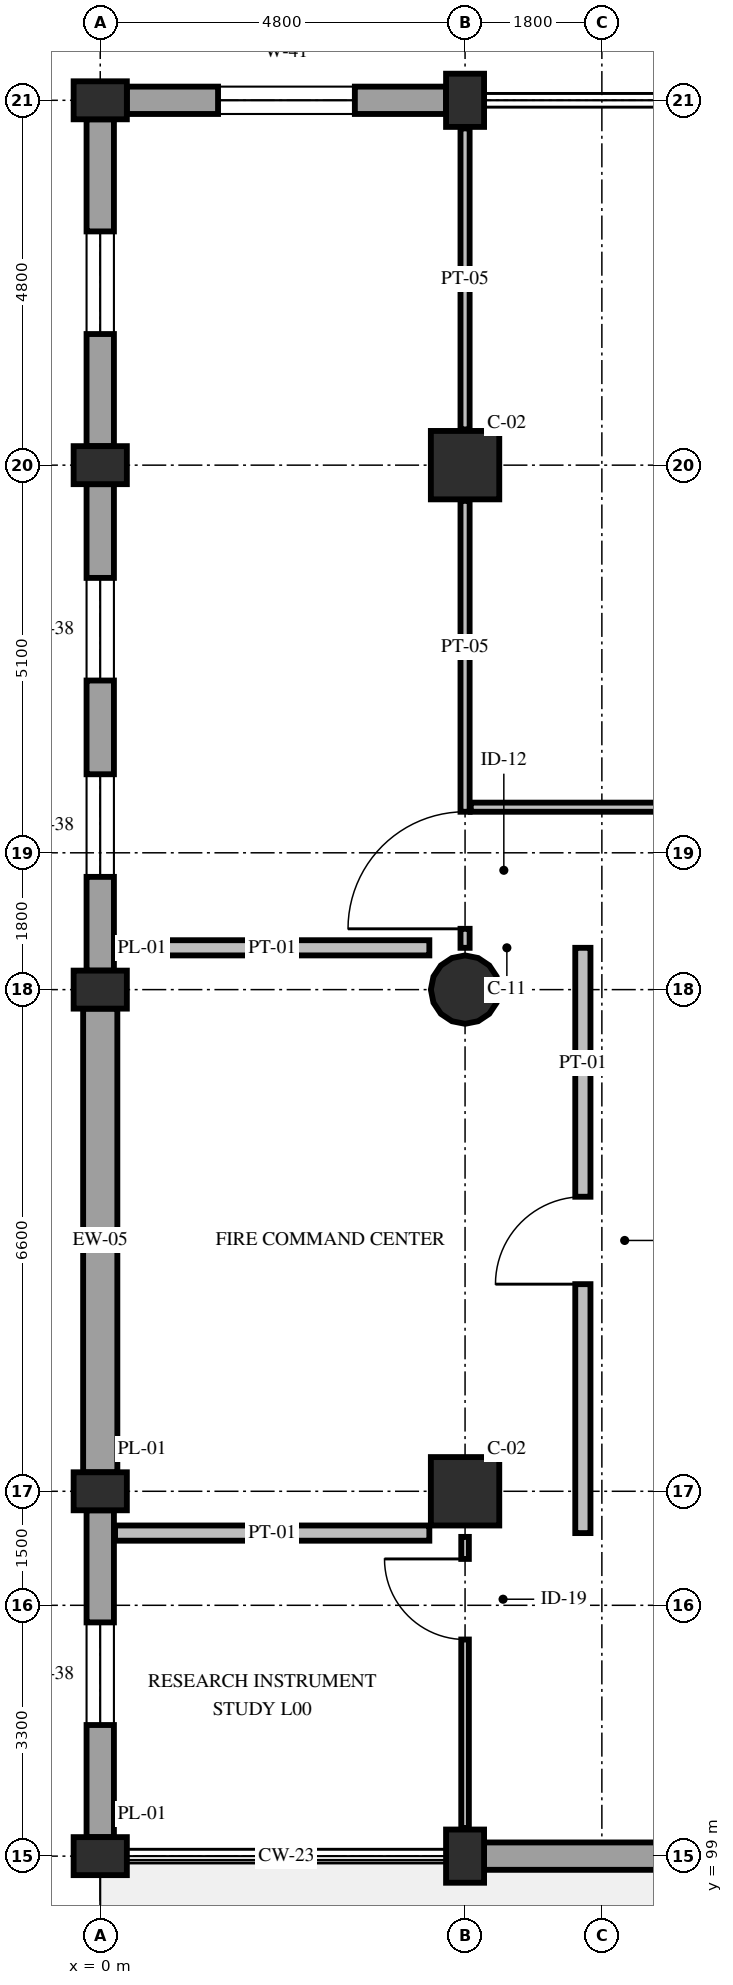
"""IFC4 building model, lengths in metres.
Left out: names, types, materials, properties, quantities, classifications, styles, units other than length and angle.
Written with IfcOpenShell. Run it as: python <this file> out.ifc"""

import sys

from ifc_helpers import new_model, si_unit, direction, frame, frame_2d, origin, origin_2d, place, context, subcontext, project, spatial, rectangle, circle, extrude, element, fill, save


model = new_model("IFC4")
c1 = context("Model", 3, precision=1e-05, world=origin(), true_north=direction((0.0, 1.0)))
c2 = subcontext(c1, "Body", "Model", "MODEL_VIEW")
j1 = project(units=[si_unit("LENGTHUNIT", "METRE"), si_unit("PLANEANGLEUNIT", "RADIAN")], contexts=[c1])
p1 = place(None, origin())
s1 = spatial("IfcSite", under=j1, at=p1, CompositionType="ELEMENT")
p2 = place(p1, origin())
s2 = spatial("IfcBuilding", under=s1, at=p2, CompositionType="ELEMENT")
p3 = place(p2, origin())
s3 = spatial("IfcBuildingStorey", under=s2, at=p3, CompositionType="ELEMENT", Elevation=0.0)
for number, where, z_axis, x_axis in (
    (1, (0.0, 99.0, 0.0), (0.0, 0.0, 1.0), (0.0, 1.0, 0.0)),
    (2, (0.0, 103.8, 0.0), (0.0, 0.0, 1.0), (0.0, 1.0, 0.0)),
    (3, (0.0, 110.4, 0.0), (0.0, 0.0, 1.0), (0.0, 1.0, 0.0)),
    (4, (0.0, 117.3, 0.0), (0.0, 0.0, 1.0), (0.0, 1.0, 0.0)),
    (5, (0.0, 122.1, 0.0), (0.0, 0.0, 1.0), (0.0, 1.0, 0.0)),
    (6, (4.8, 99.0, 0.0), (0.0, 0.0, 1.0), (1.0, 0.0, 0.0)),
):
    element("IfcColumn", number, at=place(p3, frame(where, z_axis=z_axis, x_axis=x_axis)), inside=s3, PredefinedType="PILASTER", context=c2, shape_type="SweptSolid", body=[
        extrude(rectangle(XDim=0.5, YDim=0.7, at=origin_2d()), origin(), (0.0, 0.0, 1.0), 5.4),
    ])
p4 = place(p3, frame((4.8, 103.8, 0.0), z_axis=(0.0, 0.0, 1.0), x_axis=(1.0, 0.0, 0.0)))
e7 = element("IfcColumn", 7, at=p4, inside=s3, PredefinedType="COLUMN", context=c2, shape_type="SweptSolid", body=[
    extrude(rectangle(XDim=0.9, YDim=0.9, at=origin_2d()), origin(), (0.0, 0.0, 1.0), 5.4),
])
p5 = place(p3, frame((4.8, 110.4, 0.0), z_axis=(0.0, 0.0, 1.0), x_axis=(1.0, 0.0, 0.0)))
e8 = element("IfcColumn", 8, at=p5, inside=s3, PredefinedType="COLUMN", context=c2, shape_type="SweptSolid", body=[
    extrude(circle(Radius=0.45, at=origin_2d()), origin(), (0.0, 0.0, 1.0), 5.4),
])
p6 = place(p3, frame((4.8, 117.3, 0.0), z_axis=(0.0, 0.0, 1.0), x_axis=(1.0, 0.0, 0.0)))
e9 = element("IfcColumn", 9, at=p6, inside=s3, PredefinedType="COLUMN", context=c2, shape_type="SweptSolid", body=[
    extrude(rectangle(XDim=0.9, YDim=0.9, at=origin_2d()), origin(), (0.0, 0.0, 1.0), 5.4),
])
p7 = place(p3, frame((4.8, 122.1, 0.0), z_axis=(0.0, 0.0, 1.0), x_axis=(1.0, 0.0, 0.0)))
e10 = element("IfcColumn", 10, at=p7, inside=s3, PredefinedType="PILASTER", context=c2, shape_type="SweptSolid", body=[
    extrude(rectangle(XDim=0.5, YDim=0.7, at=origin_2d()), origin(), (0.0, 0.0, 1.0), 5.4),
])
p8 = place(p3, frame((0.0, 99.25, 0.0), z_axis=(0.0, 0.0, 1.0), x_axis=(0.0, 1.0, 0.0)))
e11 = element("IfcWall", 11, at=p8, inside=s3, PredefinedType="STANDARD", context=c2, shape_type="SweptSolid", body=[
    extrude(rectangle(XDim=4.3, YDim=0.36, at=frame_2d((2.15, 0.0))), origin(), (0.0, 0.0, 1.0), 4.55),
])
p9 = place(p8, frame((1.475, 0.0, 0.85)))
e12 = element("IfcOpeningElement", 12, at=p9, cuts=e11, PredefinedType="OPENING", context=c2, shape_type="SweptSolid", body=[
    extrude(rectangle(XDim=1.35, YDim=2.08, at=frame_2d((0.675, 1.04))), frame((0.0, 0.195, 0.0), z_axis=(0.0, -1.0, 0.0), x_axis=(1.0, 0.0, 0.0)), (0.0, 0.0, 1.0), 0.39),
])
p10 = place(p3, frame((0.0, 104.05, 0.0), z_axis=(0.0, 0.0, 1.0), x_axis=(0.0, 1.0, 0.0)))
e13 = element("IfcWall", 13, at=p10, inside=s3, PredefinedType="SOLIDWALL", context=c2, shape_type="SweptSolid", body=[
    extrude(rectangle(XDim=6.1, YDim=0.45, at=frame_2d((3.05, 0.0))), origin(), (0.0, 0.0, 1.0), 4.55),
])
p11 = place(p3, frame((0.0, 110.65, 0.0), z_axis=(0.0, 0.0, 1.0), x_axis=(0.0, 1.0, 0.0)))
e14 = element("IfcWall", 14, at=p11, inside=s3, PredefinedType="STANDARD", context=c2, shape_type="SweptSolid", body=[
    extrude(rectangle(XDim=6.4, YDim=0.36, at=frame_2d((3.2, 0.0))), origin(), (0.0, 0.0, 1.0), 4.55),
])
p12 = place(p11, frame((1.233, 0.0, 0.85)))
e15 = element("IfcOpeningElement", 15, at=p12, cuts=e14, PredefinedType="OPENING", context=c2, shape_type="SweptSolid", body=[
    extrude(rectangle(XDim=1.35, YDim=2.08, at=frame_2d((0.675, 1.04))), frame((0.0, 0.195, 0.0), z_axis=(0.0, -1.0, 0.0), x_axis=(1.0, 0.0, 0.0)), (0.0, 0.0, 1.0), 0.39),
])
p13 = place(p11, frame((3.817, 0.0, 0.85)))
e16 = element("IfcOpeningElement", 16, at=p13, cuts=e14, PredefinedType="OPENING", context=c2, shape_type="SweptSolid", body=[
    extrude(rectangle(XDim=1.35, YDim=2.08, at=frame_2d((0.675, 1.04))), frame((0.0, 0.195, 0.0), z_axis=(0.0, -1.0, 0.0), x_axis=(1.0, 0.0, 0.0)), (0.0, 0.0, 1.0), 0.39),
])
p14 = place(p3, frame((0.0, 117.55, 0.0), z_axis=(0.0, 0.0, 1.0), x_axis=(0.0, 1.0, 0.0)))
e17 = element("IfcWall", 17, at=p14, inside=s3, PredefinedType="STANDARD", context=c2, shape_type="SweptSolid", body=[
    extrude(rectangle(XDim=4.3, YDim=0.36, at=frame_2d((2.15, 0.0))), origin(), (0.0, 0.0, 1.0), 4.55),
])
p15 = place(p14, frame((1.475, 0.0, 0.85)))
e18 = element("IfcOpeningElement", 18, at=p15, cuts=e17, PredefinedType="OPENING", context=c2, shape_type="SweptSolid", body=[
    extrude(rectangle(XDim=1.35, YDim=2.08, at=frame_2d((0.675, 1.04))), frame((0.0, 0.195, 0.0), z_axis=(0.0, -1.0, 0.0), x_axis=(1.0, 0.0, 0.0)), (0.0, 0.0, 1.0), 0.39),
])
p16 = place(p3, frame((0.35, 122.1, 0.0), z_axis=(0.0, 0.0, 1.0), x_axis=(1.0, 0.0, 0.0)))
e19 = element("IfcWall", 19, at=p16, inside=s3, PredefinedType="STANDARD", context=c2, shape_type="SweptSolid", body=[
    extrude(rectangle(XDim=4.2, YDim=0.36, at=frame_2d((2.1, 0.0))), origin(), (0.0, 0.0, 1.0), 4.55),
])
p17 = place(p16, frame((1.2, 0.0, 0.85)))
e20 = element("IfcOpeningElement", 20, at=p17, cuts=e19, PredefinedType="OPENING", context=c2, shape_type="SweptSolid", body=[
    extrude(rectangle(XDim=1.8, YDim=2.24, at=frame_2d((0.9, 1.12))), frame((0.0, 0.195, 0.0), z_axis=(0.0, -1.0, 0.0), x_axis=(1.0, 0.0, 0.0)), (0.0, 0.0, 1.0), 0.39),
])
p18 = place(p3, frame((12.95, 99.0, 0.0), z_axis=(0.0, 0.0, 1.0), x_axis=(-1.0, 0.0, 0.0)))
e21 = element("IfcWall", 21, at=p18, inside=s3, PredefinedType="STANDARD", context=c2, shape_type="SweptSolid", body=[
    extrude(rectangle(XDim=7.9, YDim=0.36, at=frame_2d((3.95, 0.0))), origin(), (0.0, 0.0, 1.0), 4.53),
])
p19 = place(p18, frame((3.4, 0.0, 0.0)))
e22 = element("IfcOpeningElement", 22, at=p19, cuts=e21, PredefinedType="OPENING", context=c2, shape_type="SweptSolid", body=[
    extrude(rectangle(XDim=1.1, YDim=2.3, at=frame_2d((0.55, 1.15))), frame((0.0, 0.195, 0.0), z_axis=(0.0, -1.0, 0.0), x_axis=(1.0, 0.0, 0.0)), (0.0, 0.0, 1.0), 0.39),
])
for number, where, z_axis, x_axis in (
    (23, (0.195, 103.25, 0.0), (0.0, 0.0, 1.0), (1.0, 0.0, 0.0)),
    (24, (0.195, 110.95, 0.0), (0.0, 0.0, 1.0), (1.0, 0.0, 0.0)),
):
    element("IfcWall", number, at=place(p3, frame(where, z_axis=z_axis, x_axis=x_axis)), inside=s3, PredefinedType="PARTITIONING", context=c2, shape_type="SweptSolid", body=[
        extrude(rectangle(XDim=4.135, YDim=0.2, at=frame_2d((2.067, 0.0))), origin(), (0.0, 0.0, 1.0), 4.68),
    ])
p20 = place(p3, frame((6.35, 103.25, 0.0), z_axis=(0.0, 0.0, 1.0), x_axis=(0.0, 1.0, 0.0)))
e25 = element("IfcWall", 25, at=p20, inside=s3, PredefinedType="PARTITIONING", context=c2, shape_type="SweptSolid", body=[
    extrude(rectangle(XDim=7.7, YDim=0.2, at=frame_2d((3.85, 0.0))), origin(), (0.0, 0.0, 1.0), 4.43),
])
p21 = place(p20, frame((3.275, 0.0, 0.0)))
e26 = element("IfcOpeningElement", 26, at=p21, cuts=e25, PredefinedType="OPENING", context=c2, shape_type="SweptSolid", body=[
    extrude(rectangle(XDim=1.15, YDim=2.25, at=frame_2d((0.575, 1.125))), frame((0.0, 0.115, 0.0), z_axis=(0.0, -1.0, 0.0), x_axis=(1.0, 0.0, 0.0)), (0.0, 0.0, 1.0), 0.23),
])
p22 = place(p3, frame((4.8, 110.95, 0.0), z_axis=(0.0, 0.0, 1.0), x_axis=(0.0, 1.0, 0.0)))
e27 = element("IfcWall", 27, at=p22, inside=s3, PredefinedType="PARTITIONING", context=c2, shape_type="SweptSolid", body=[
    extrude(rectangle(XDim=5.88, YDim=0.12, at=frame_2d((2.94, 0.0))), origin(), (0.0, 0.0, 1.0), 4.73),
])
p23 = place(p22, frame((0.25, 0.0, 0.0)))
e28 = element("IfcOpeningElement", 28, at=p23, cuts=e27, PredefinedType="OPENING", context=c2, shape_type="SweptSolid", body=[
    extrude(rectangle(XDim=1.54, YDim=2.25, at=frame_2d((0.77, 1.125))), frame((0.0, 0.075, 0.0), z_axis=(0.0, -1.0, 0.0), x_axis=(1.0, 0.0, 0.0)), (0.0, 0.0, 1.0), 0.15),
])
p24 = place(p3, frame((4.8, 117.77, 0.0), z_axis=(0.0, 0.0, 1.0), x_axis=(0.0, 1.0, 0.0)))
e29 = element("IfcWall", 29, at=p24, inside=s3, PredefinedType="PARTITIONING", context=c2, shape_type="SweptSolid", body=[
    extrude(rectangle(XDim=3.96, YDim=0.12, at=frame_2d((1.98, 0.0))), origin(), (0.0, 0.0, 1.0), 4.73),
])
p25 = place(p3, frame((4.875, 112.8, 0.0), z_axis=(0.0, 0.0, 1.0), x_axis=(1.0, 0.0, 0.0)))
e30 = element("IfcWall", 30, at=p25, inside=s3, PredefinedType="PARTITIONING", context=c2, shape_type="SweptSolid", body=[
    extrude(rectangle(XDim=14.065, YDim=0.12, at=frame_2d((7.032, 0.0))), origin(), (0.0, 0.0, 1.0), 4.73),
])
p26 = place(p25, frame((9.035, 0.0, 0.0)))
e31 = element("IfcOpeningElement", 31, at=p26, cuts=e30, PredefinedType="OPENING", context=c2, shape_type="SweptSolid", body=[
    extrude(rectangle(XDim=1.68, YDim=2.3, at=frame_2d((0.84, 1.15))), frame((0.0, 0.075, 0.0), z_axis=(0.0, -1.0, 0.0), x_axis=(1.0, 0.0, 0.0)), (0.0, 0.0, 1.0), 0.15),
])
p27 = place(p3, frame((4.8, 99.37, 0.0), z_axis=(0.0, 0.0, 1.0), x_axis=(0.0, 1.0, 0.0)))
e32 = element("IfcWall", 32, at=p27, inside=s3, PredefinedType="PARTITIONING", context=c2, shape_type="SweptSolid", body=[
    extrude(rectangle(XDim=3.83, YDim=0.1, at=frame_2d((1.915, 0.0))), origin(), (0.0, 0.0, 1.0), 4.73),
])
p28 = place(p27, frame((2.48, 0.0, 0.0)))
e33 = element("IfcOpeningElement", 33, at=p28, cuts=e32, PredefinedType="OPENING", context=c2, shape_type="SweptSolid", body=[
    extrude(rectangle(XDim=1.06, YDim=2.2, at=frame_2d((0.53, 1.1))), frame((0.0, 0.065, 0.0), z_axis=(0.0, -1.0, 0.0), x_axis=(1.0, 0.0, 0.0)), (0.0, 0.0, 1.0), 0.13),
])
p29 = place(p9, origin())
e34 = element("IfcWindow", 34, at=p29, inside=s3, PartitioningType="SINGLE_PANEL", PredefinedType="WINDOW", context=c2, shape_type="SweptSolid", body=[
    extrude(rectangle(XDim=1.35, YDim=2.08, at=frame_2d((0.675, 1.04))), frame((0.0, 0.03, 0.0), z_axis=(0.0, -1.0, 0.0), x_axis=(1.0, 0.0, 0.0)), (0.0, 0.0, 1.0), 0.06),
])
fill(e12, e34)
p30 = place(p12, origin())
e35 = element("IfcWindow", 35, at=p30, inside=s3, PartitioningType="SINGLE_PANEL", PredefinedType="WINDOW", context=c2, shape_type="SweptSolid", body=[
    extrude(rectangle(XDim=1.35, YDim=2.08, at=frame_2d((0.675, 1.04))), frame((0.0, 0.03, 0.0), z_axis=(0.0, -1.0, 0.0), x_axis=(1.0, 0.0, 0.0)), (0.0, 0.0, 1.0), 0.06),
])
fill(e15, e35)
p31 = place(p13, origin())
e36 = element("IfcWindow", 36, at=p31, inside=s3, PartitioningType="SINGLE_PANEL", PredefinedType="WINDOW", context=c2, shape_type="SweptSolid", body=[
    extrude(rectangle(XDim=1.35, YDim=2.08, at=frame_2d((0.675, 1.04))), frame((0.0, 0.03, 0.0), z_axis=(0.0, -1.0, 0.0), x_axis=(1.0, 0.0, 0.0)), (0.0, 0.0, 1.0), 0.06),
])
fill(e16, e36)
p32 = place(p15, origin())
e37 = element("IfcWindow", 37, at=p32, inside=s3, PartitioningType="SINGLE_PANEL", PredefinedType="WINDOW", context=c2, shape_type="SweptSolid", body=[
    extrude(rectangle(XDim=1.35, YDim=2.08, at=frame_2d((0.675, 1.04))), frame((0.0, 0.03, 0.0), z_axis=(0.0, -1.0, 0.0), x_axis=(1.0, 0.0, 0.0)), (0.0, 0.0, 1.0), 0.06),
])
fill(e18, e37)
p33 = place(p17, origin())
e38 = element("IfcWindow", 38, at=p33, inside=s3, PartitioningType="DOUBLE_PANEL_VERTICAL", PredefinedType="WINDOW", context=c2, shape_type="SweptSolid", body=[
    extrude(rectangle(XDim=1.8, YDim=2.24, at=frame_2d((0.9, 1.12))), frame((0.0, 0.03, 0.0), z_axis=(0.0, -1.0, 0.0), x_axis=(1.0, 0.0, 0.0)), (0.0, 0.0, 1.0), 0.06),
])
fill(e20, e38)
p34 = place(p21, origin())
e39 = element("IfcDoor", 39, at=p34, inside=s3, OperationType="SINGLE_SWING_LEFT", PredefinedType="DOOR", context=c2, shape_type="SweptSolid", body=[
    extrude(rectangle(XDim=1.15, YDim=2.25, at=frame_2d((0.575, 1.125))), frame((0.0, 0.025, 0.0), z_axis=(0.0, -1.0, 0.0), x_axis=(1.0, 0.0, 0.0)), (0.0, 0.0, 1.0), 0.05),
])
fill(e26, e39)
p35 = place(p23, origin())
e40 = element("IfcDoor", 40, at=p35, inside=s3, OperationType="SINGLE_SWING_LEFT", PredefinedType="DOOR", context=c2, shape_type="SweptSolid", body=[
    extrude(rectangle(XDim=1.54, YDim=2.25, at=frame_2d((0.77, 1.125))), frame((0.0, 0.025, 0.0), z_axis=(0.0, -1.0, 0.0), x_axis=(1.0, 0.0, 0.0)), (0.0, 0.0, 1.0), 0.05),
])
fill(e28, e40)
p36 = place(p28, origin())
e41 = element("IfcDoor", 41, at=p36, inside=s3, OperationType="SINGLE_SWING_RIGHT", PredefinedType="DOOR", context=c2, shape_type="SweptSolid", body=[
    extrude(rectangle(XDim=1.06, YDim=2.2, at=frame_2d((0.53, 1.1))), frame((0.0, 0.025, 0.0), z_axis=(0.0, -1.0, 0.0), x_axis=(1.0, 0.0, 0.0)), (0.0, 0.0, 1.0), 0.05),
])
fill(e33, e41)
save(model, sys.argv[1])
